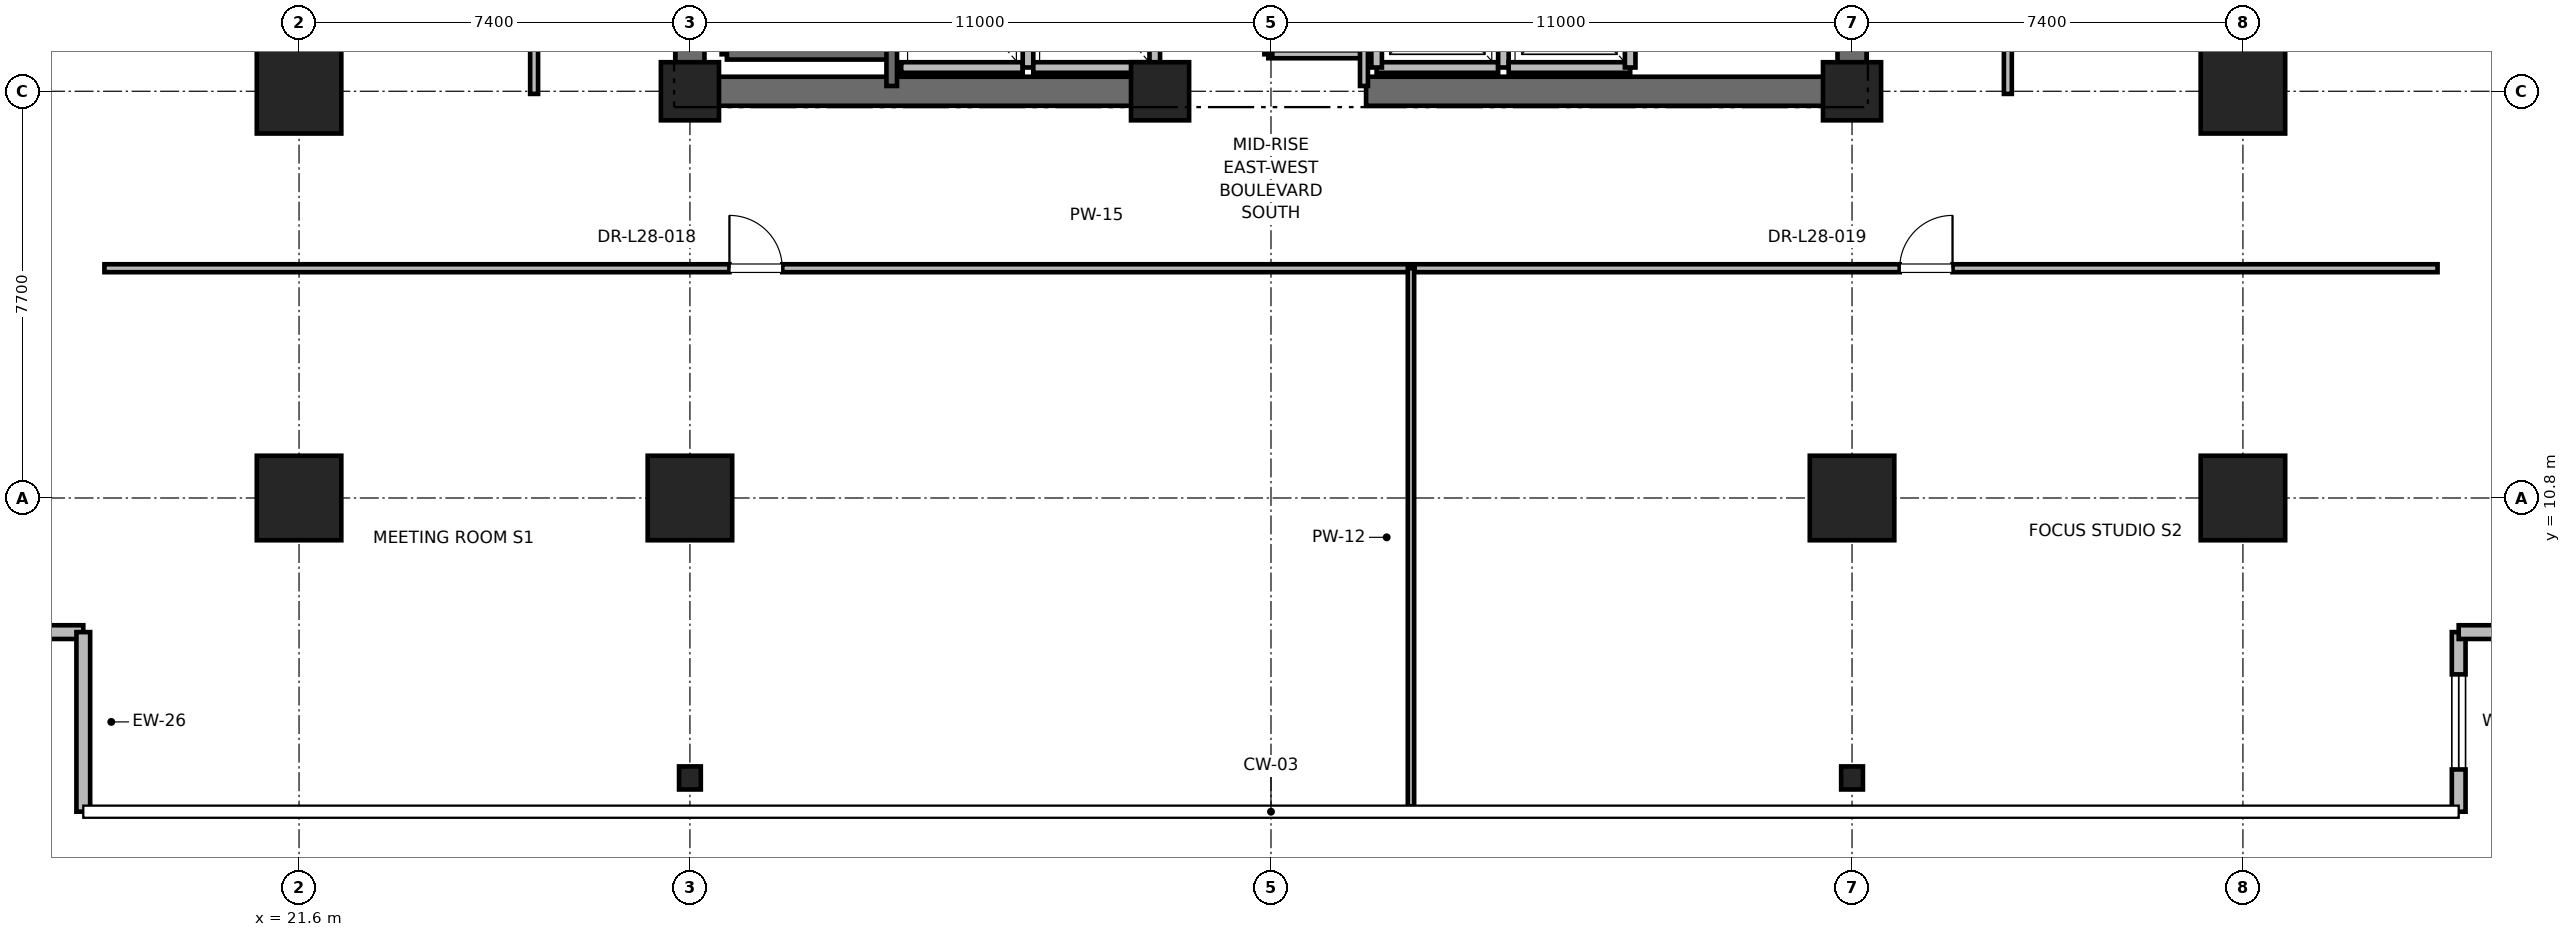
"""IFC4 building model, lengths in metres.
Left out: names, types, materials, properties, quantities, classifications, styles, units other than length and angle.
Written with IfcOpenShell. Run it as: python <this file> out.ifc"""

import sys

from ifc_helpers import new_model, si_unit, direction, frame, frame_2d, origin, origin_2d, place, context, subcontext, project, spatial, rectangle, i_section, extrude, element, fill, save


model = new_model("IFC4")
c1 = context("Model", 3, precision=1e-05, world=origin(), true_north=direction((0.0, 1.0)))
c2 = subcontext(c1, "Body", "Model", "MODEL_VIEW")
j1 = project(units=[si_unit("LENGTHUNIT", "METRE"), si_unit("PLANEANGLEUNIT", "RADIAN")], contexts=[c1])
p1 = place(None, origin())
s1 = spatial("IfcSite", under=j1, at=p1, CompositionType="ELEMENT")
p2 = place(p1, origin())
s2 = spatial("IfcBuilding", under=s1, at=p2, CompositionType="ELEMENT")
p3 = place(p2, frame((0.0, 0.0, 123.4)))
s3 = spatial("IfcBuildingStorey", under=s2, at=p3, CompositionType="ELEMENT", Elevation=123.4)
for number, where, z_axis, x_axis in (
    (1, (29.0, 10.8, 0.0), (0.0, 0.0, 1.0), (1.0, 0.0, 0.0)),
    (2, (51.0, 10.8, 0.0), (0.0, 0.0, 1.0), (1.0, 0.0, 0.0)),
    (3, (21.6, 18.5, 0.0), (0.0, 0.0, 1.0), (1.0, 0.0, 0.0)),
    (4, (58.4, 18.5, 0.0), (0.0, 0.0, 1.0), (1.0, 0.0, 0.0)),
    (5, (21.6, 10.8, 0.0), (0.0, 0.0, 1.0), (1.0, 0.0, 0.0)),
    (6, (58.4, 10.8, 0.0), (0.0, 0.0, 1.0), (1.0, 0.0, 0.0)),
):
    element("IfcColumn", number, at=place(p3, frame(where, z_axis=z_axis, x_axis=x_axis)), inside=s3, PredefinedType="COLUMN", context=c2, shape_type="SweptSolid", body=[
        extrude(rectangle(XDim=1.6, YDim=1.6, at=origin_2d()), origin(), (0.0, 0.0, 1.0), 5.0),
    ])
for number, where, z_axis, x_axis in (
    (7, (29.0, 5.5, 0.0), (0.0, 0.0, 1.0), (1.0, 0.0, 0.0)),
    (8, (51.0, 5.5, 0.0), (0.0, 0.0, 1.0), (1.0, 0.0, 0.0)),
):
    element("IfcColumn", number, at=place(p3, frame(where, z_axis=z_axis, x_axis=x_axis)), inside=s3, PredefinedType="COLUMN", context=c2, shape_type="SweptSolid", body=[
        extrude(i_section(OverallWidth=0.412, OverallDepth=0.437, WebThickness=0.036, FlangeThickness=0.058, FilletRadius=0.015, at=origin_2d()), origin(), (0.0, 0.0, 1.0), 5.0),
    ])
for number, where, z_axis, x_axis in (
    (9, (29.0, 18.5, 0.0), (0.0, 0.0, 1.0), (1.0, 0.0, 0.0)),
    (10, (51.0, 18.5, 0.0), (0.0, 0.0, 1.0), (1.0, 0.0, 0.0)),
    (11, (37.9, 18.5, 0.0), (0.0, 0.0, 1.0), (1.0, 0.0, 0.0)),
):
    element("IfcColumn", number, at=place(p3, frame(where, z_axis=z_axis, x_axis=x_axis)), inside=s3, PredefinedType="PILASTER", context=c2, shape_type="SweptSolid", body=[
        extrude(rectangle(XDim=1.1, YDim=1.1, at=origin_2d()), origin(), (0.0, 0.0, 1.0), 5.0),
    ])
for number, where, z_axis, x_axis in (
    (12, (29.0, 18.5, 0.0), (0.0, 0.0, 1.0), (1.0, 0.0, 0.0)),
    (13, (41.8, 18.5, 0.0), (0.0, 0.0, 1.0), (1.0, 0.0, 0.0)),
):
    element("IfcWall", number, at=place(p3, frame(where, z_axis=z_axis, x_axis=x_axis)), inside=s3, PredefinedType="SHEAR", context=c2, shape_type="SweptSolid", body=[
        extrude(rectangle(XDim=9.2, YDim=0.55, at=frame_2d((4.6, 0.0))), origin(), (0.0, 0.0, 1.0), 4.775),
    ])
p4 = place(p3, frame((29.0, 18.5, 0.0), z_axis=(0.0, 0.0, 1.0), x_axis=(0.0, 1.0, 0.0)))
e14 = element("IfcWall", 14, at=p4, inside=s3, PredefinedType="SHEAR", context=c2, shape_type="SweptSolid", body=[
    extrude(rectangle(XDim=8.8, YDim=0.55, at=frame_2d((4.4, 0.0))), origin(), (0.0, 0.0, 1.0), 4.775),
])
p5 = place(p3, frame((51.0, 18.5, 0.0), z_axis=(0.0, 0.0, 1.0), x_axis=(0.0, 1.0, 0.0)))
e15 = element("IfcWall", 15, at=p5, inside=s3, PredefinedType="SHEAR", context=c2, shape_type="SweptSolid", body=[
    extrude(rectangle(XDim=5.8, YDim=0.55, at=frame_2d((2.9, 0.0))), origin(), (0.0, 0.0, 1.0), 4.775),
])
p6 = place(p3, frame((13.715, 8.261, 0.0), z_axis=(0.0, 0.0, 1.0), x_axis=(1.0, 0.0, 0.0)))
e16 = element("IfcWall", 16, at=p6, inside=s3, PredefinedType="PARAPET", context=c2, shape_type="SweptSolid", body=[
    extrude(rectangle(XDim=3.8, YDim=0.26, at=frame_2d((1.9, 0.0))), origin(), (0.0, 0.0, 1.0), 4.775),
])
p7 = place(p6, frame((1.0, 0.0, 0.85)))
e17 = element("IfcOpeningElement", 17, at=p7, cuts=e16, PredefinedType="OPENING", context=c2, shape_type="SweptSolid", body=[
    extrude(rectangle(XDim=1.8, YDim=2.2, at=frame_2d((0.9, 1.1))), frame((0.0, 0.13, 0.0), z_axis=(0.0, -1.0, 0.0), x_axis=(1.0, 0.0, 0.0)), (0.0, 0.0, 1.0), 0.26),
])
p8 = place(p3, frame((17.515, 8.261, 0.0), z_axis=(0.0, 0.0, 1.0), x_axis=(0.0, -1.0, 0.0)))
e18 = element("IfcWall", 18, at=p8, inside=s3, PredefinedType="PARAPET", context=c2, shape_type="SweptSolid", body=[
    extrude(rectangle(XDim=3.4, YDim=0.26, at=frame_2d((1.7, 0.0))), origin(), (0.0, 0.0, 1.0), 4.775),
])
p9 = place(p3, frame((62.485, 4.861, 0.0), z_axis=(0.0, 0.0, 1.0), x_axis=(0.0, 1.0, 0.0)))
e19 = element("IfcWall", 19, at=p9, inside=s3, PredefinedType="PARAPET", context=c2, shape_type="SweptSolid", body=[
    extrude(rectangle(XDim=3.4, YDim=0.26, at=frame_2d((1.7, 0.0))), origin(), (0.0, 0.0, 1.0), 4.775),
])
p10 = place(p9, frame((0.8, 0.0, 0.85)))
e20 = element("IfcOpeningElement", 20, at=p10, cuts=e19, PredefinedType="OPENING", context=c2, shape_type="SweptSolid", body=[
    extrude(rectangle(XDim=1.8, YDim=2.2, at=frame_2d((0.9, 1.1))), frame((0.0, 0.13, 0.0), z_axis=(0.0, -1.0, 0.0), x_axis=(1.0, 0.0, 0.0)), (0.0, 0.0, 1.0), 0.26),
])
p11 = place(p3, frame((62.485, 8.261, 0.0), z_axis=(0.0, 0.0, 1.0), x_axis=(1.0, 0.0, 0.0)))
e21 = element("IfcWall", 21, at=p11, inside=s3, PredefinedType="PARAPET", context=c2, shape_type="SweptSolid", body=[
    extrude(rectangle(XDim=3.8, YDim=0.26, at=frame_2d((1.9, 0.0))), origin(), (0.0, 0.0, 1.0), 4.775),
])
p12 = place(p3, frame((29.7, 19.2, 0.0), z_axis=(0.0, 0.0, 1.0), x_axis=(0.0, 1.0, 0.0)))
e22 = element("IfcWall", 22, at=p12, inside=s3, PredefinedType="SOLIDWALL", context=c2, shape_type="SweptSolid", body=[
    extrude(rectangle(XDim=8.15, YDim=0.2, at=frame_2d((4.075, 0.0))), origin(), (0.0, 0.0, 1.0), 4.775),
])
p13 = place(p3, frame((29.7, 19.2, 0.0), z_axis=(0.0, 0.0, 1.0), x_axis=(1.0, 0.0, 0.0)))
e23 = element("IfcWall", 23, at=p13, inside=s3, PredefinedType="SOLIDWALL", context=c2, shape_type="SweptSolid", body=[
    extrude(rectangle(XDim=3.12, YDim=0.2, at=frame_2d((1.56, 0.0))), origin(), (0.0, 0.0, 1.0), 4.775),
])
p14 = place(p3, frame((32.82, 18.6, 0.0), z_axis=(0.0, 0.0, 1.0), x_axis=(0.0, 1.0, 0.0)))
e24 = element("IfcWall", 24, at=p14, inside=s3, PredefinedType="SOLIDWALL", context=c2, shape_type="SweptSolid", body=[
    extrude(rectangle(XDim=8.78, YDim=0.2, at=frame_2d((4.39, 0.0))), origin(), (0.0, 0.0, 1.0), 4.775),
])
p15 = place(p3, frame((33.0, 18.95, 0.0), z_axis=(0.0, 0.0, 1.0), x_axis=(1.0, 0.0, 0.0)))
e25 = element("IfcWall", 25, at=p15, inside=s3, PredefinedType="SOLIDWALL", context=c2, shape_type="SweptSolid", body=[
    extrude(rectangle(XDim=2.3, YDim=0.2, at=frame_2d((1.15, 0.0))), origin(), (0.0, 0.0, 1.0), 4.775),
])
p16 = place(p3, frame((35.4, 18.95, 0.0), z_axis=(0.0, 0.0, 1.0), x_axis=(0.0, 1.0, 0.0)))
e26 = element("IfcWall", 26, at=p16, inside=s3, PredefinedType="SOLIDWALL", context=c2, shape_type="SweptSolid", body=[
    extrude(rectangle(XDim=2.6, YDim=0.2, at=frame_2d((1.3, 0.0))), origin(), (0.0, 0.0, 1.0), 4.775),
])
p17 = place(p3, frame((35.5, 18.95, 0.0), z_axis=(0.0, 0.0, 1.0), x_axis=(1.0, 0.0, 0.0)))
e27 = element("IfcWall", 27, at=p17, inside=s3, PredefinedType="SOLIDWALL", context=c2, shape_type="SweptSolid", body=[
    extrude(rectangle(XDim=2.3, YDim=0.2, at=frame_2d((1.15, 0.0))), origin(), (0.0, 0.0, 1.0), 3.755),
])
p18 = place(p3, frame((37.8, 18.95, 0.0), z_axis=(0.0, 0.0, 1.0), x_axis=(0.0, 1.0, 0.0)))
e28 = element("IfcWall", 28, at=p18, inside=s3, PredefinedType="SOLIDWALL", context=c2, shape_type="SweptSolid", body=[
    extrude(rectangle(XDim=2.6, YDim=0.2, at=frame_2d((1.3, 0.0))), origin(), (0.0, 0.0, 1.0), 3.755),
])
p19 = place(p3, frame((42.0, 18.95, 0.0), z_axis=(0.0, 0.0, 1.0), x_axis=(1.0, 0.0, 0.0)))
e29 = element("IfcWall", 29, at=p19, inside=s3, PredefinedType="SOLIDWALL", context=c2, shape_type="SweptSolid", body=[
    extrude(rectangle(XDim=2.3, YDim=0.2, at=frame_2d((1.15, 0.0))), origin(), (0.0, 0.0, 1.0), 3.755),
])
p20 = place(p3, frame((42.0, 21.55, 0.0), z_axis=(0.0, 0.0, 1.0), x_axis=(0.0, -1.0, 0.0)))
e30 = element("IfcWall", 30, at=p20, inside=s3, PredefinedType="SOLIDWALL", context=c2, shape_type="SweptSolid", body=[
    extrude(rectangle(XDim=2.6, YDim=0.2, at=frame_2d((1.3, 0.0))), origin(), (0.0, 0.0, 1.0), 3.755),
])
p21 = place(p3, frame((44.4, 18.95, 0.0), z_axis=(0.0, 0.0, 1.0), x_axis=(0.0, 1.0, 0.0)))
e31 = element("IfcWall", 31, at=p21, inside=s3, PredefinedType="SOLIDWALL", context=c2, shape_type="SweptSolid", body=[
    extrude(rectangle(XDim=2.6, YDim=0.2, at=frame_2d((1.3, 0.0))), origin(), (0.0, 0.0, 1.0), 4.775),
])
p22 = place(p3, frame((44.5, 18.95, 0.0), z_axis=(0.0, 0.0, 1.0), x_axis=(1.0, 0.0, 0.0)))
e32 = element("IfcWall", 32, at=p22, inside=s3, PredefinedType="SOLIDWALL", context=c2, shape_type="SweptSolid", body=[
    extrude(rectangle(XDim=2.3, YDim=0.2, at=frame_2d((1.15, 0.0))), origin(), (0.0, 0.0, 1.0), 4.775),
])
p23 = place(p3, frame((46.8, 18.95, 0.0), z_axis=(0.0, 0.0, 1.0), x_axis=(0.0, 1.0, 0.0)))
e33 = element("IfcWall", 33, at=p23, inside=s3, PredefinedType="SOLIDWALL", context=c2, shape_type="SweptSolid", body=[
    extrude(rectangle(XDim=2.6, YDim=0.2, at=frame_2d((1.3, 0.0))), origin(), (0.0, 0.0, 1.0), 4.775),
])
p24 = place(p3, frame((39.95, 19.2, 0.0), z_axis=(0.0, 0.0, 1.0), x_axis=(1.0, 0.0, 0.0)))
e34 = element("IfcWall", 34, at=p24, inside=s3, PredefinedType="PARTITIONING", context=c2, shape_type="SweptSolid", body=[
    extrude(rectangle(XDim=1.81, YDim=0.15, at=frame_2d((0.905, 0.0))), origin(), (0.0, 0.0, 1.0), 2.85),
])
p25 = place(p3, frame((41.76, 18.6, 0.0), z_axis=(0.0, 0.0, 1.0), x_axis=(0.0, 1.0, 0.0)))
e35 = element("IfcWall", 35, at=p25, inside=s3, PredefinedType="PARTITIONING", context=c2, shape_type="SweptSolid", body=[
    extrude(rectangle(XDim=3.6, YDim=0.15, at=frame_2d((1.8, 0.0))), origin(), (0.0, 0.0, 1.0), 2.85),
])
p26 = place(p3, frame((39.95, 19.2, 0.0), z_axis=(0.0, 0.0, 1.0), x_axis=(0.0, 1.0, 0.0)))
e36 = element("IfcWall", 36, at=p26, inside=s3, PredefinedType="PARTITIONING", context=c2, shape_type="SweptSolid", body=[
    extrude(rectangle(XDim=3.0, YDim=0.15, at=frame_2d((1.5, 0.0))), origin(), (0.0, 0.0, 1.0), 2.85),
])
p27 = place(p26, frame((1.05, 0.0, 0.0)))
e37 = element("IfcOpeningElement", 37, at=p27, cuts=e36, PredefinedType="OPENING", context=c2, shape_type="SweptSolid", body=[
    extrude(rectangle(XDim=0.9, YDim=2.1, at=frame_2d((0.45, 1.05))), frame((0.0, 0.075, 0.0), z_axis=(0.0, -1.0, 0.0), x_axis=(1.0, 0.0, 0.0)), (0.0, 0.0, 1.0), 0.15),
])
p28 = place(p3, frame((17.915, 15.15, 0.0), z_axis=(0.0, 0.0, 1.0), x_axis=(1.0, 0.0, 0.0)))
e38 = element("IfcWall", 38, at=p28, inside=s3, PredefinedType="PARTITIONING", context=c2, shape_type="SweptSolid", body=[
    extrude(rectangle(XDim=24.735, YDim=0.15, at=frame_2d((12.367, 0.0))), origin(), (0.0, 0.0, 1.0), 2.85),
])
p29 = place(p28, frame((11.833, 0.0, 0.0)))
e39 = element("IfcOpeningElement", 39, at=p29, cuts=e38, PredefinedType="OPENING", context=c2, shape_type="SweptSolid", body=[
    extrude(rectangle(XDim=1.0, YDim=2.15, at=frame_2d((0.5, 1.075))), frame((0.0, 0.075, 0.0), z_axis=(0.0, -1.0, 0.0), x_axis=(1.0, 0.0, 0.0)), (0.0, 0.0, 1.0), 0.15),
])
p30 = place(p3, frame((42.65, 4.961, 0.0), z_axis=(0.0, 0.0, 1.0), x_axis=(0.0, 1.0, 0.0)))
e40 = element("IfcWall", 40, at=p30, inside=s3, PredefinedType="PARTITIONING", context=c2, shape_type="SweptSolid", body=[
    extrude(rectangle(XDim=10.189, YDim=0.12, at=frame_2d((5.095, 0.0))), origin(), (0.0, 0.0, 1.0), 2.85),
])
p31 = place(p3, frame((42.72, 15.15, 0.0), z_axis=(0.0, 0.0, 1.0), x_axis=(1.0, 0.0, 0.0)))
e41 = element("IfcWall", 41, at=p31, inside=s3, PredefinedType="PARTITIONING", context=c2, shape_type="SweptSolid", body=[
    extrude(rectangle(XDim=19.365, YDim=0.15, at=frame_2d((9.682, 0.0))), origin(), (0.0, 0.0, 1.0), 2.85),
])
p32 = place(p31, frame((9.182, 0.0, 0.0)))
e42 = element("IfcOpeningElement", 42, at=p32, cuts=e41, PredefinedType="OPENING", context=c2, shape_type="SweptSolid", body=[
    extrude(rectangle(XDim=1.0, YDim=2.15, at=frame_2d((0.5, 1.075))), frame((0.0, 0.075, 0.0), z_axis=(0.0, -1.0, 0.0), x_axis=(1.0, 0.0, 0.0)), (0.0, 0.0, 1.0), 0.15),
])
p33 = place(p3, frame((26.05, 18.45, 0.0), z_axis=(0.0, 0.0, 1.0), x_axis=(0.0, 1.0, 0.0)))
e43 = element("IfcWall", 43, at=p33, inside=s3, PredefinedType="PARTITIONING", context=c2, shape_type="SweptSolid", body=[
    extrude(rectangle(XDim=7.602, YDim=0.15, at=frame_2d((3.801, 0.0))), origin(), (0.0, 0.0, 1.0), 2.85),
])
p34 = place(p33, frame((3.341, 0.0, 0.0)))
e44 = element("IfcOpeningElement", 44, at=p34, cuts=e43, PredefinedType="OPENING", context=c2, shape_type="SweptSolid", body=[
    extrude(rectangle(XDim=1.0, YDim=2.15, at=frame_2d((0.5, 1.075))), frame((0.0, 0.075, 0.0), z_axis=(0.0, -1.0, 0.0), x_axis=(1.0, 0.0, 0.0)), (0.0, 0.0, 1.0), 0.15),
])
p35 = place(p3, frame((53.95, 18.45, 0.0), z_axis=(0.0, 0.0, 1.0), x_axis=(0.0, 1.0, 0.0)))
e45 = element("IfcWall", 45, at=p35, inside=s3, PredefinedType="PARTITIONING", context=c2, shape_type="SweptSolid", body=[
    extrude(rectangle(XDim=18.1, YDim=0.15, at=frame_2d((9.05, 0.0))), origin(), (0.0, 0.0, 1.0), 2.85),
])
p36 = place(p35, frame((8.55, 0.0, 0.0)))
e46 = element("IfcOpeningElement", 46, at=p36, cuts=e45, PredefinedType="OPENING", context=c2, shape_type="SweptSolid", body=[
    extrude(rectangle(XDim=1.0, YDim=2.15, at=frame_2d((0.5, 1.075))), frame((0.0, 0.075, 0.0), z_axis=(0.0, -1.0, 0.0), x_axis=(1.0, 0.0, 0.0)), (0.0, 0.0, 1.0), 0.15),
])
p37 = place(p10, origin())
e47 = element("IfcWindow", 47, at=p37, inside=s3, PartitioningType="SINGLE_PANEL", PredefinedType="WINDOW", context=c2, shape_type="SweptSolid", body=[
    extrude(rectangle(XDim=1.8, YDim=2.2, at=frame_2d((0.9, 1.1))), frame((0.0, 0.03, 0.0), z_axis=(0.0, -1.0, 0.0), x_axis=(1.0, 0.0, 0.0)), (0.0, 0.0, 1.0), 0.06),
])
fill(e20, e47)
p38 = place(p29, origin())
e48 = element("IfcDoor", 48, at=p38, inside=s3, OperationType="SINGLE_SWING_LEFT", PredefinedType="DOOR", context=c2, shape_type="SweptSolid", body=[
    extrude(rectangle(XDim=1.0, YDim=2.15, at=frame_2d((0.5, 1.075))), frame((0.0, 0.025, 0.0), z_axis=(0.0, -1.0, 0.0), x_axis=(1.0, 0.0, 0.0)), (0.0, 0.0, 1.0), 0.05),
])
fill(e39, e48)
p39 = place(p32, origin())
e49 = element("IfcDoor", 49, at=p39, inside=s3, OperationType="SINGLE_SWING_RIGHT", PredefinedType="DOOR", context=c2, shape_type="SweptSolid", body=[
    extrude(rectangle(XDim=1.0, YDim=2.15, at=frame_2d((0.5, 1.075))), frame((0.0, 0.025, 0.0), z_axis=(0.0, -1.0, 0.0), x_axis=(1.0, 0.0, 0.0)), (0.0, 0.0, 1.0), 0.05),
])
fill(e42, e49)
save(model, sys.argv[1])
